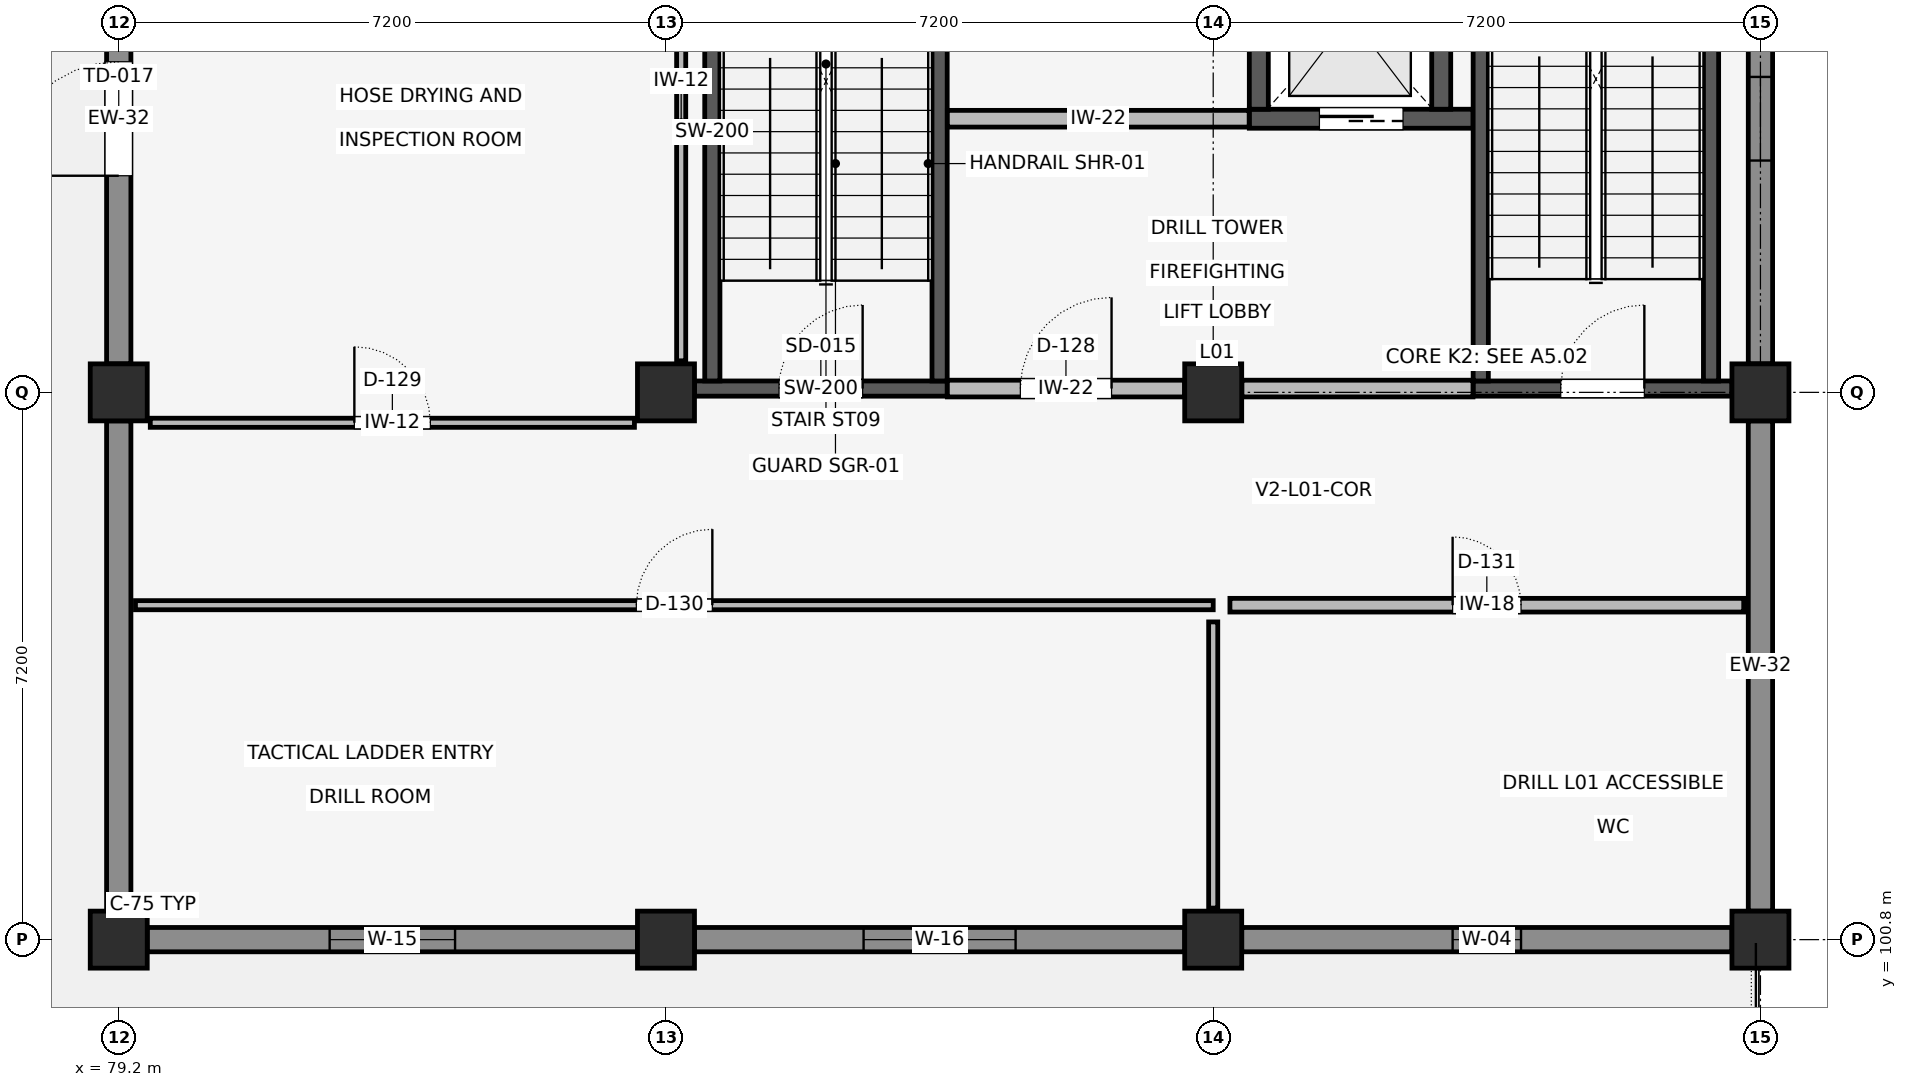
"""IFC4 building model, lengths in metres.
Left out: names, types, materials, properties, quantities, classifications, styles, units other than length and angle.
Written with IfcOpenShell. Run it as: python <this file> out.ifc"""

import sys

from ifc_helpers import new_model, si_unit, direction, frame, frame_2d, origin, origin_2d, place, context, subcontext, project, spatial, rectangle, extrude, element, fill, save


model = new_model("IFC4")
c1 = context("Model", 3, precision=1e-05, world=origin(), true_north=direction((0.0, 1.0)))
c2 = subcontext(c1, "Body", "Model", "MODEL_VIEW")
j1 = project(units=[si_unit("LENGTHUNIT", "METRE"), si_unit("PLANEANGLEUNIT", "RADIAN")], contexts=[c1])
p1 = place(None, origin())
s1 = spatial("IfcSite", under=j1, at=p1, CompositionType="ELEMENT")
p2 = place(p1, origin())
s2 = spatial("IfcBuilding", under=s1, at=p2, CompositionType="ELEMENT")
p3 = place(p2, frame((0.0, 0.0, 5.4)))
s3 = spatial("IfcBuildingStorey", under=s2, at=p3, CompositionType="ELEMENT", Elevation=5.4)
for number, where, z_axis, x_axis in (
    (1, (79.2, 100.8, 0.0), (0.0, 0.0, 1.0), (1.0, 0.0, 0.0)),
    (2, (79.2, 108.0, 0.0), (0.0, 0.0, 1.0), (1.0, 0.0, 0.0)),
    (3, (86.4, 100.8, 0.0), (0.0, 0.0, 1.0), (1.0, 0.0, 0.0)),
    (4, (86.4, 108.0, 0.0), (0.0, 0.0, 1.0), (1.0, 0.0, 0.0)),
    (5, (93.6, 100.8, 0.0), (0.0, 0.0, 1.0), (1.0, 0.0, 0.0)),
    (6, (93.6, 108.0, 0.0), (0.0, 0.0, 1.0), (1.0, 0.0, 0.0)),
    (7, (100.8, 100.8, 0.0), (0.0, 0.0, 1.0), (1.0, 0.0, 0.0)),
    (8, (100.8, 108.0, 0.0), (0.0, 0.0, 1.0), (1.0, 0.0, 0.0)),
):
    element("IfcColumn", number, at=place(p3, frame(where, z_axis=z_axis, x_axis=x_axis)), inside=s3, PredefinedType="COLUMN", context=c2, shape_type="SweptSolid", body=[
        extrude(rectangle(XDim=0.75, YDim=0.75, at=origin_2d()), origin(), (0.0, 0.0, 1.0), 4.2),
    ])
p4 = place(p3, frame((94.075, 111.6, 0.0), z_axis=(0.0, 0.0, 1.0), x_axis=(1.0, 0.0, 0.0)))
e9 = element("IfcWall", 9, at=p4, inside=s3, PredefinedType="SHEAR", context=c2, shape_type="SweptSolid", body=[
    extrude(rectangle(XDim=2.945, YDim=0.25, at=frame_2d((1.473, 0.0))), origin(), (0.0, 0.0, 1.0), 3.95),
])
p5 = place(p4, frame((0.923, 0.0, 0.0)))
e10 = element("IfcOpeningElement", 10, at=p5, cuts=e9, PredefinedType="OPENING", context=c2, shape_type="SweptSolid", body=[
    extrude(rectangle(XDim=1.1, YDim=2.15, at=frame_2d((0.55, 1.075))), frame((0.0, 0.137, 0.0), z_axis=(0.0, -1.0, 0.0), x_axis=(1.0, 0.0, 0.0)), (0.0, 0.0, 1.0), 0.274),
])
for number, where, z_axis, x_axis in (
    (11, (94.2, 111.725, 0.0), (0.0, 0.0, 1.0), (0.0, 1.0, 0.0)),
    (12, (96.6, 111.725, 0.0), (0.0, 0.0, 1.0), (0.0, 1.0, 0.0)),
):
    element("IfcWall", number, at=place(p3, frame(where, z_axis=z_axis, x_axis=x_axis)), inside=s3, PredefinedType="SHEAR", context=c2, shape_type="SweptSolid", body=[
        extrude(rectangle(XDim=2.45, YDim=0.25, at=frame_2d((1.225, 0.0))), origin(), (0.0, 0.0, 1.0), 3.95),
    ])
p6 = place(p3, frame((97.02, 108.05, 0.0), z_axis=(0.0, 0.0, 1.0), x_axis=(1.0, 0.0, 0.0)))
e13 = element("IfcWall", 13, at=p6, inside=s3, PredefinedType="SHEAR", context=c2, shape_type="SweptSolid", body=[
    extrude(rectangle(XDim=3.405, YDim=0.2, at=frame_2d((1.703, 0.0))), origin(), (0.0, 0.0, 1.0), 3.95),
])
p7 = place(p6, frame((1.153, 0.0, 0.0)))
e14 = element("IfcOpeningElement", 14, at=p7, cuts=e13, PredefinedType="OPENING", context=c2, shape_type="SweptSolid", body=[
    extrude(rectangle(XDim=1.1, YDim=2.15, at=frame_2d((0.55, 1.075))), frame((0.0, 0.112, 0.0), z_axis=(0.0, -1.0, 0.0), x_axis=(1.0, 0.0, 0.0)), (0.0, 0.0, 1.0), 0.224),
])
for number, where, z_axis, x_axis in (
    (15, (97.12, 108.15, 0.0), (0.0, 0.0, 1.0), (0.0, 1.0, 0.0)),
    (16, (100.15, 108.15, 0.0), (0.0, 0.0, 1.0), (0.0, 1.0, 0.0)),
):
    element("IfcWall", number, at=place(p3, frame(where, z_axis=z_axis, x_axis=x_axis)), inside=s3, PredefinedType="SHEAR", context=c2, shape_type="SweptSolid", body=[
        extrude(rectangle(XDim=6.6, YDim=0.2, at=frame_2d((3.3, 0.0))), origin(), (0.0, 0.0, 1.0), 3.95),
    ])
p8 = place(p3, frame((86.775, 108.05, 0.0), z_axis=(0.0, 0.0, 1.0), x_axis=(1.0, 0.0, 0.0)))
e17 = element("IfcWall", 17, at=p8, inside=s3, PredefinedType="SHEAR", context=c2, shape_type="SweptSolid", body=[
    extrude(rectangle(XDim=3.325, YDim=0.2, at=frame_2d((1.663, 0.0))), origin(), (0.0, 0.0, 1.0), 3.95),
])
p9 = place(p8, frame((1.113, 0.0, 0.0)))
e18 = element("IfcOpeningElement", 18, at=p9, cuts=e17, PredefinedType="OPENING", context=c2, shape_type="SweptSolid", body=[
    extrude(rectangle(XDim=1.1, YDim=2.15, at=frame_2d((0.55, 1.075))), frame((0.0, 0.112, 0.0), z_axis=(0.0, -1.0, 0.0), x_axis=(1.0, 0.0, 0.0)), (0.0, 0.0, 1.0), 0.224),
])
for number, where, z_axis, x_axis in (
    (19, (87.01, 108.15, 0.0), (0.0, 0.0, 1.0), (0.0, 1.0, 0.0)),
    (20, (90.0, 108.15, 0.0), (0.0, 0.0, 1.0), (0.0, 1.0, 0.0)),
):
    element("IfcWall", number, at=place(p3, frame(where, z_axis=z_axis, x_axis=x_axis)), inside=s3, PredefinedType="SHEAR", context=c2, shape_type="SweptSolid", body=[
        extrude(rectangle(XDim=6.56, YDim=0.2, at=frame_2d((3.28, 0.0))), origin(), (0.0, 0.0, 1.0), 3.95),
    ])
p10 = place(p3, frame((100.8, 101.175, 0.0), z_axis=(0.0, 0.0, 1.0), x_axis=(0.0, 1.0, 0.0)))
e21 = element("IfcWall", 21, at=p10, inside=s3, PredefinedType="ELEMENTEDWALL", context=c2, shape_type="SweptSolid", body=[
    extrude(rectangle(XDim=6.45, YDim=0.32, at=frame_2d((3.225, 0.0))), origin(), (0.0, 0.0, 1.0), 3.34),
])
p11 = place(p3, frame((100.8, 108.375, 0.0), z_axis=(0.0, 0.0, 1.0), x_axis=(0.0, 1.0, 0.0)))
e22 = element("IfcWall", 22, at=p11, inside=s3, PredefinedType="ELEMENTEDWALL", context=c2, shape_type="SweptSolid", body=[
    extrude(rectangle(XDim=6.45, YDim=0.32, at=frame_2d((3.225, 0.0))), origin(), (0.0, 0.0, 1.0), 3.29),
])
p12 = place(p11, frame((2.675, 0.0, 0.85)))
e23 = element("IfcOpeningElement", 23, at=p12, cuts=e22, PredefinedType="OPENING", context=c2, shape_type="SweptSolid", body=[
    extrude(rectangle(XDim=1.1, YDim=1.75, at=frame_2d((0.55, 0.875))), frame((0.0, 0.172, 0.0), z_axis=(0.0, -1.0, 0.0), x_axis=(1.0, 0.0, 0.0)), (0.0, 0.0, 1.0), 0.344),
])
p13 = place(p3, frame((79.2, 114.825, 0.0), z_axis=(0.0, 0.0, 1.0), x_axis=(0.0, -1.0, 0.0)))
e24 = element("IfcWall", 24, at=p13, inside=s3, PredefinedType="ELEMENTEDWALL", context=c2, shape_type="SweptSolid", body=[
    extrude(rectangle(XDim=6.45, YDim=0.32, at=frame_2d((3.225, 0.0))), origin(), (0.0, 0.0, 1.0), 3.29),
])
p14 = place(p13, frame((2.475, 0.0, 0.0)))
e25 = element("IfcOpeningElement", 25, at=p14, cuts=e24, PredefinedType="OPENING", context=c2, shape_type="SweptSolid", body=[
    extrude(rectangle(XDim=1.5, YDim=2.2, at=frame_2d((0.75, 1.1))), frame((0.0, 0.172, 0.0), z_axis=(0.0, -1.0, 0.0), x_axis=(1.0, 0.0, 0.0)), (0.0, 0.0, 1.0), 0.344),
])
p15 = place(p3, frame((79.2, 107.625, 0.0), z_axis=(0.0, 0.0, 1.0), x_axis=(0.0, -1.0, 0.0)))
e26 = element("IfcWall", 26, at=p15, inside=s3, PredefinedType="ELEMENTEDWALL", context=c2, shape_type="SweptSolid", body=[
    extrude(rectangle(XDim=6.45, YDim=0.32, at=frame_2d((3.225, 0.0))), origin(), (0.0, 0.0, 1.0), 3.34),
])
p16 = place(p3, frame((79.575, 100.8, 0.0), z_axis=(0.0, 0.0, 1.0), x_axis=(1.0, 0.0, 0.0)))
e27 = element("IfcWall", 27, at=p16, inside=s3, PredefinedType="ELEMENTEDWALL", context=c2, shape_type="SweptSolid", body=[
    extrude(rectangle(XDim=6.45, YDim=0.32, at=frame_2d((3.225, 0.0))), origin(), (0.0, 0.0, 1.0), 3.19),
])
p17 = place(p16, frame((2.4, 0.0, 0.85)))
e28 = element("IfcOpeningElement", 28, at=p17, cuts=e27, PredefinedType="OPENING", context=c2, shape_type="SweptSolid", body=[
    extrude(rectangle(XDim=1.65, YDim=1.9, at=frame_2d((0.825, 0.95))), frame((0.0, 0.172, 0.0), z_axis=(0.0, -1.0, 0.0), x_axis=(1.0, 0.0, 0.0)), (0.0, 0.0, 1.0), 0.344),
])
p18 = place(p3, frame((86.775, 100.8, 0.0), z_axis=(0.0, 0.0, 1.0), x_axis=(1.0, 0.0, 0.0)))
e29 = element("IfcWall", 29, at=p18, inside=s3, PredefinedType="ELEMENTEDWALL", context=c2, shape_type="SweptSolid", body=[
    extrude(rectangle(XDim=6.45, YDim=0.32, at=frame_2d((3.225, 0.0))), origin(), (0.0, 0.0, 1.0), 3.24),
])
p19 = place(p18, frame((2.225, 0.0, 0.85)))
e30 = element("IfcOpeningElement", 30, at=p19, cuts=e29, PredefinedType="OPENING", context=c2, shape_type="SweptSolid", body=[
    extrude(rectangle(XDim=2.0, YDim=1.85, at=frame_2d((1.0, 0.925))), frame((0.0, 0.172, 0.0), z_axis=(0.0, -1.0, 0.0), x_axis=(1.0, 0.0, 0.0)), (0.0, 0.0, 1.0), 0.344),
])
p20 = place(p3, frame((93.975, 100.8, 0.0), z_axis=(0.0, 0.0, 1.0), x_axis=(1.0, 0.0, 0.0)))
e31 = element("IfcWall", 31, at=p20, inside=s3, PredefinedType="ELEMENTEDWALL", context=c2, shape_type="SweptSolid", body=[
    extrude(rectangle(XDim=6.45, YDim=0.32, at=frame_2d((3.225, 0.0))), origin(), (0.0, 0.0, 1.0), 3.19),
])
p21 = place(p20, frame((2.775, 0.0, 0.8)))
e32 = element("IfcOpeningElement", 32, at=p21, cuts=e31, PredefinedType="OPENING", context=c2, shape_type="SweptSolid", body=[
    extrude(rectangle(XDim=0.9, YDim=2.0, at=frame_2d((0.45, 1.0))), frame((0.0, 0.172, 0.0), z_axis=(0.0, -1.0, 0.0), x_axis=(1.0, 0.0, 0.0)), (0.0, 0.0, 1.0), 0.344),
])
p22 = place(p3, frame((90.102, 108.05, 0.0), z_axis=(0.0, 0.0, 1.0), x_axis=(1.0, 0.0, 0.0)))
e33 = element("IfcWall", 33, at=p22, inside=s3, PredefinedType="STANDARD", context=c2, shape_type="SweptSolid", body=[
    extrude(rectangle(XDim=3.121, YDim=0.22, at=frame_2d((1.561, 0.0))), origin(), (0.0, 0.0, 1.0), 3.92),
])
p23 = place(p22, frame((0.96, 0.0, 0.0)))
e34 = element("IfcOpeningElement", 34, at=p23, cuts=e33, PredefinedType="OPENING", context=c2, shape_type="SweptSolid", body=[
    extrude(rectangle(XDim=1.2, YDim=2.2, at=frame_2d((0.6, 1.1))), frame((0.0, 0.122, 0.0), z_axis=(0.0, -1.0, 0.0), x_axis=(1.0, 0.0, 0.0)), (0.0, 0.0, 1.0), 0.244),
])
p24 = place(p3, frame((93.977, 108.05, 0.0), z_axis=(0.0, 0.0, 1.0), x_axis=(1.0, 0.0, 0.0)))
e35 = element("IfcWall", 35, at=p24, inside=s3, PredefinedType="STANDARD", context=c2, shape_type="SweptSolid", body=[
    extrude(rectangle(XDim=3.041, YDim=0.22, at=frame_2d((1.521, 0.0))), origin(), (0.0, 0.0, 1.0), 3.92),
])
p25 = place(p3, frame((90.102, 111.6, 0.0), z_axis=(0.0, 0.0, 1.0), x_axis=(1.0, 0.0, 0.0)))
e36 = element("IfcWall", 36, at=p25, inside=s3, PredefinedType="STANDARD", context=c2, shape_type="SweptSolid", body=[
    extrude(rectangle(XDim=3.971, YDim=0.22, at=frame_2d((1.985, 0.0))), origin(), (0.0, 0.0, 1.0), 3.288),
])
p26 = place(p3, frame((79.615, 107.6, 0.0), z_axis=(0.0, 0.0, 1.0), x_axis=(1.0, 0.0, 0.0)))
e37 = element("IfcWall", 37, at=p26, inside=s3, PredefinedType="PARTITIONING", context=c2, shape_type="SweptSolid", body=[
    extrude(rectangle(XDim=6.37, YDim=0.12, at=frame_2d((3.185, 0.0))), origin(), (0.0, 0.0, 1.0), 3.388),
])
p27 = place(p26, frame((2.685, 0.0, 0.0)))
e38 = element("IfcOpeningElement", 38, at=p27, cuts=e37, PredefinedType="OPENING", context=c2, shape_type="SweptSolid", body=[
    extrude(rectangle(XDim=1.0, YDim=2.15, at=frame_2d((0.5, 1.075))), frame((0.0, 0.072, 0.0), z_axis=(0.0, -1.0, 0.0), x_axis=(1.0, 0.0, 0.0)), (0.0, 0.0, 1.0), 0.144),
])
p28 = place(p3, frame((86.6, 108.415, 0.0), z_axis=(0.0, 0.0, 1.0), x_axis=(0.0, 1.0, 0.0)))
e39 = element("IfcWall", 39, at=p28, inside=s3, PredefinedType="PARTITIONING", context=c2, shape_type="SweptSolid", body=[
    extrude(rectangle(XDim=6.262, YDim=0.12, at=frame_2d((3.131, 0.0))), origin(), (0.0, 0.0, 1.0), 3.288),
])
p29 = place(p3, frame((79.42, 105.2, 0.0), z_axis=(0.0, 0.0, 1.0), x_axis=(1.0, 0.0, 0.0)))
e40 = element("IfcWall", 40, at=p29, inside=s3, PredefinedType="PARTITIONING", context=c2, shape_type="SweptSolid", body=[
    extrude(rectangle(XDim=14.18, YDim=0.12, at=frame_2d((7.09, 0.0))), origin(), (0.0, 0.0, 1.0), 3.338),
])
p30 = place(p29, frame((6.59, 0.0, 0.0)))
e41 = element("IfcOpeningElement", 41, at=p30, cuts=e40, PredefinedType="OPENING", context=c2, shape_type="SweptSolid", body=[
    extrude(rectangle(XDim=1.0, YDim=2.15, at=frame_2d((0.5, 1.075))), frame((0.0, 0.072, 0.0), z_axis=(0.0, -1.0, 0.0), x_axis=(1.0, 0.0, 0.0)), (0.0, 0.0, 1.0), 0.144),
])
p31 = place(p3, frame((93.6, 101.215, 0.0), z_axis=(0.0, 0.0, 1.0), x_axis=(0.0, 1.0, 0.0)))
e42 = element("IfcWall", 42, at=p31, inside=s3, PredefinedType="PARTITIONING", context=c2, shape_type="SweptSolid", body=[
    extrude(rectangle(XDim=3.765, YDim=0.12, at=frame_2d((1.882, 0.0))), origin(), (0.0, 0.0, 1.0), 3.338),
])
p32 = place(p3, frame((93.82, 105.2, 0.0), z_axis=(0.0, 0.0, 1.0), x_axis=(1.0, 0.0, 0.0)))
e43 = element("IfcWall", 43, at=p32, inside=s3, PredefinedType="PLUMBINGWALL", context=c2, shape_type="SweptSolid", body=[
    extrude(rectangle(XDim=6.76, YDim=0.18, at=frame_2d((3.38, 0.0))), origin(), (0.0, 0.0, 1.0), 3.92),
])
p33 = place(p32, frame((2.93, 0.0, 0.0)))
e44 = element("IfcOpeningElement", 44, at=p33, cuts=e43, PredefinedType="OPENING", context=c2, shape_type="SweptSolid", body=[
    extrude(rectangle(XDim=0.9, YDim=2.1, at=frame_2d((0.45, 1.05))), frame((0.0, 0.102, 0.0), z_axis=(0.0, -1.0, 0.0), x_axis=(1.0, 0.0, 0.0)), (0.0, 0.0, 1.0), 0.204),
])
p34 = place(p12, origin())
e45 = element("IfcWindow", 45, at=p34, inside=s3, PartitioningType="SINGLE_PANEL", PredefinedType="WINDOW", context=c2, shape_type="SweptSolid", body=[
    extrude(rectangle(XDim=1.1, YDim=1.75, at=frame_2d((0.55, 0.875))), frame((0.0, 0.03, 0.0), z_axis=(0.0, -1.0, 0.0), x_axis=(1.0, 0.0, 0.0)), (0.0, 0.0, 1.0), 0.06),
])
fill(e23, e45)
p35 = place(p14, frame((1.5, 0.0, 0.0), z_axis=(0.0, 0.0, 1.0), x_axis=(-1.0, 0.0, 0.0)))
e46 = element("IfcDoor", 46, at=p35, inside=s3, OperationType="DOUBLE_SWING_LEFT", PredefinedType="DOOR", context=c2, shape_type="SweptSolid", body=[
    extrude(rectangle(XDim=1.5, YDim=2.2, at=frame_2d((0.75, 1.1))), frame((0.0, 0.025, 0.0), z_axis=(0.0, -1.0, 0.0), x_axis=(1.0, 0.0, 0.0)), (0.0, 0.0, 1.0), 0.05),
])
fill(e25, e46)
p36 = place(p17, origin())
e47 = element("IfcWindow", 47, at=p36, inside=s3, PartitioningType="SINGLE_PANEL", PredefinedType="WINDOW", context=c2, shape_type="SweptSolid", body=[
    extrude(rectangle(XDim=1.65, YDim=1.9, at=frame_2d((0.825, 0.95))), frame((0.0, 0.03, 0.0), z_axis=(0.0, -1.0, 0.0), x_axis=(1.0, 0.0, 0.0)), (0.0, 0.0, 1.0), 0.06),
])
fill(e28, e47)
p37 = place(p19, origin())
e48 = element("IfcWindow", 48, at=p37, inside=s3, PartitioningType="SINGLE_PANEL", PredefinedType="WINDOW", context=c2, shape_type="SweptSolid", body=[
    extrude(rectangle(XDim=2.0, YDim=1.85, at=frame_2d((1.0, 0.925))), frame((0.0, 0.03, 0.0), z_axis=(0.0, -1.0, 0.0), x_axis=(1.0, 0.0, 0.0)), (0.0, 0.0, 1.0), 0.06),
])
fill(e30, e48)
p38 = place(p21, origin())
e49 = element("IfcWindow", 49, at=p38, inside=s3, PartitioningType="SINGLE_PANEL", PredefinedType="WINDOW", context=c2, shape_type="SweptSolid", body=[
    extrude(rectangle(XDim=0.9, YDim=2.0, at=frame_2d((0.45, 1.0))), frame((0.0, 0.03, 0.0), z_axis=(0.0, -1.0, 0.0), x_axis=(1.0, 0.0, 0.0)), (0.0, 0.0, 1.0), 0.06),
])
fill(e32, e49)
p39 = place(p7, origin())
e50 = element("IfcDoor", 50, at=p39, inside=s3, OperationType="SINGLE_SWING_RIGHT", PredefinedType="DOOR", context=c2, shape_type="SweptSolid", body=[
    extrude(rectangle(XDim=1.1, YDim=2.15, at=frame_2d((0.55, 1.075))), frame((0.0, 0.025, 0.0), z_axis=(0.0, -1.0, 0.0), x_axis=(1.0, 0.0, 0.0)), (0.0, 0.0, 1.0), 0.05),
])
fill(e14, e50)
p40 = place(p9, origin())
e51 = element("IfcDoor", 51, at=p40, inside=s3, OperationType="SINGLE_SWING_RIGHT", PredefinedType="DOOR", context=c2, shape_type="SweptSolid", body=[
    extrude(rectangle(XDim=1.1, YDim=2.15, at=frame_2d((0.55, 1.075))), frame((0.0, 0.025, 0.0), z_axis=(0.0, -1.0, 0.0), x_axis=(1.0, 0.0, 0.0)), (0.0, 0.0, 1.0), 0.05),
])
fill(e18, e51)
p41 = place(p5, origin())
e52 = element("IfcDoor", 52, at=p41, inside=s3, OperationType="SLIDING_TO_LEFT", PredefinedType="DOOR", context=c2, shape_type="SweptSolid", body=[
    extrude(rectangle(XDim=1.1, YDim=2.15, at=frame_2d((0.55, 1.075))), frame((0.0, 0.025, 0.0), z_axis=(0.0, -1.0, 0.0), x_axis=(1.0, 0.0, 0.0)), (0.0, 0.0, 1.0), 0.05),
])
fill(e10, e52)
p42 = place(p23, origin())
e53 = element("IfcDoor", 53, at=p42, inside=s3, OperationType="SINGLE_SWING_RIGHT", PredefinedType="DOOR", context=c2, shape_type="SweptSolid", body=[
    extrude(rectangle(XDim=1.2, YDim=2.2, at=frame_2d((0.6, 1.1))), frame((0.0, 0.025, 0.0), z_axis=(0.0, -1.0, 0.0), x_axis=(1.0, 0.0, 0.0)), (0.0, 0.0, 1.0), 0.05),
])
fill(e34, e53)
p43 = place(p27, origin())
e54 = element("IfcDoor", 54, at=p43, inside=s3, OperationType="SINGLE_SWING_LEFT", PredefinedType="DOOR", context=c2, shape_type="SweptSolid", body=[
    extrude(rectangle(XDim=1.0, YDim=2.15, at=frame_2d((0.5, 1.075))), frame((0.0, 0.025, 0.0), z_axis=(0.0, -1.0, 0.0), x_axis=(1.0, 0.0, 0.0)), (0.0, 0.0, 1.0), 0.05),
])
fill(e38, e54)
p44 = place(p30, origin())
e55 = element("IfcDoor", 55, at=p44, inside=s3, OperationType="SINGLE_SWING_RIGHT", PredefinedType="DOOR", context=c2, shape_type="SweptSolid", body=[
    extrude(rectangle(XDim=1.0, YDim=2.15, at=frame_2d((0.5, 1.075))), frame((0.0, 0.025, 0.0), z_axis=(0.0, -1.0, 0.0), x_axis=(1.0, 0.0, 0.0)), (0.0, 0.0, 1.0), 0.05),
])
fill(e41, e55)
p45 = place(p33, origin())
e56 = element("IfcDoor", 56, at=p45, inside=s3, OperationType="SINGLE_SWING_LEFT", PredefinedType="DOOR", context=c2, shape_type="SweptSolid", body=[
    extrude(rectangle(XDim=0.9, YDim=2.1, at=frame_2d((0.45, 1.05))), frame((0.0, 0.025, 0.0), z_axis=(0.0, -1.0, 0.0), x_axis=(1.0, 0.0, 0.0)), (0.0, 0.0, 1.0), 0.05),
])
fill(e44, e56)
save(model, sys.argv[1])
